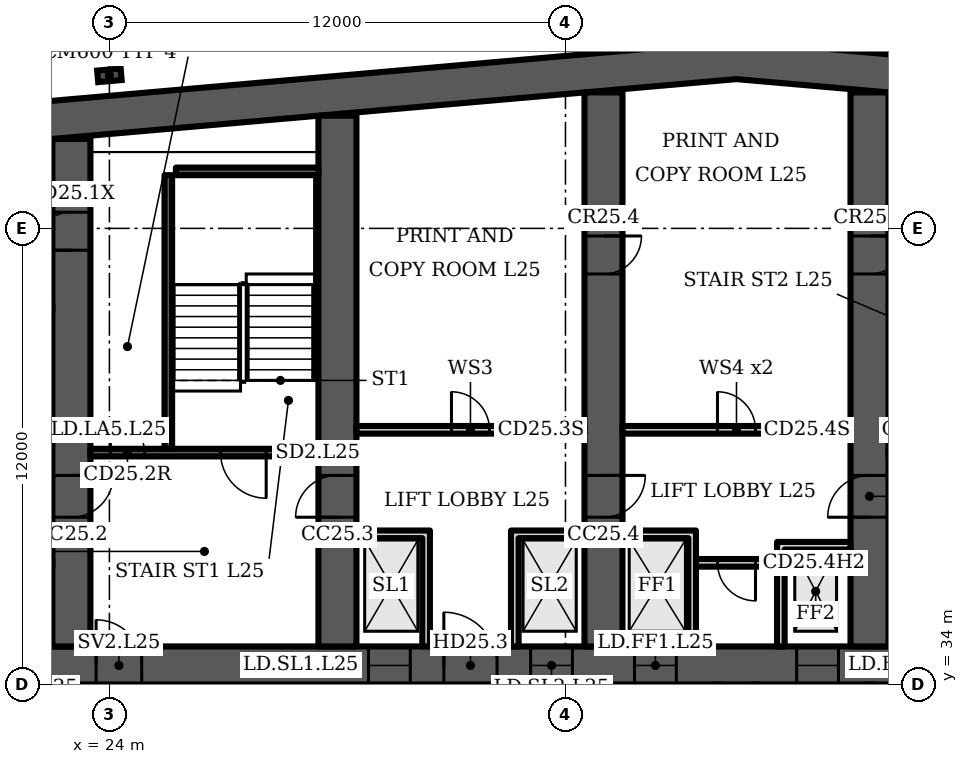
"""IFC4 building model, lengths in metres.
Left out: names, types, materials, properties, quantities, classifications, styles, units other than length and angle.
Written with IfcOpenShell. Run it as: python <this file> out.ifc"""

import sys

from ifc_helpers import new_model, si_unit, direction, frame, frame_2d, origin, origin_2d, place, context, subcontext, project, spatial, polyline, rectangle, i_section, outline, extrude, element, fill, save


model = new_model("IFC4")
c1 = context("Model", 3, precision=1e-05, world=origin(), true_north=direction((0.0, 1.0)))
c2 = subcontext(c1, "Body", "Model", "MODEL_VIEW")
j1 = project(units=[si_unit("LENGTHUNIT", "METRE"), si_unit("PLANEANGLEUNIT", "RADIAN")], contexts=[c1])
p1 = place(None, origin())
s1 = spatial("IfcSite", under=j1, at=p1, CompositionType="ELEMENT")
p2 = place(p1, origin())
s2 = spatial("IfcBuilding", under=s1, at=p2, CompositionType="ELEMENT")
p3 = place(p2, frame((0.0, 0.0, 111.1)))
s3 = spatial("IfcBuildingStorey", under=s2, at=p3, CompositionType="ELEMENT", Elevation=111.1)
p4 = place(p3, frame((0.0, 0.0, -0.0)))
e1 = element("IfcWall", 1, at=p4, inside=s3, PredefinedType="SHEAR", context=c2, shape_type="SweptSolid", body=[
    extrude(outline(polyline([(16.0, 47.784), (40.5, 49.927), (65.0, 47.784), (65.0, 48.787), (40.5, 50.931), (16.0, 48.787), (16.0, 47.784)])), origin(), (0.0, 0.0, 1.0), 3.6),
])
p5 = place(p3, frame((16.0, 34.5, 0.0), z_axis=(0.0, 0.0, 1.0), x_axis=(1.0, 0.0, 0.0)))
e2 = element("IfcWall", 2, at=p5, inside=s3, PredefinedType="SHEAR", context=c2, shape_type="SweptSolid", body=[
    extrude(rectangle(XDim=49.0, YDim=1.0, at=frame_2d((24.5, 0.0))), origin(), (0.0, 0.0, 1.0), 3.6),
])
p6 = place(p5, frame((1.2, 0.0, 0.0)))
e3 = element("IfcOpeningElement", 3, at=p6, cuts=e2, PredefinedType="OPENING", context=c2, shape_type="SweptSolid", body=[
    extrude(rectangle(XDim=1.1, YDim=2.1, at=frame_2d((0.55, 1.05))), frame((0.0, 0.51, 0.0), z_axis=(0.0, -1.0, 0.0), x_axis=(1.0, 0.0, 0.0)), (0.0, 0.0, 1.0), 1.02),
])
p7 = place(p5, frame((5.083, 0.0, 0.0)))
e4 = element("IfcOpeningElement", 4, at=p7, cuts=e2, PredefinedType="OPENING", context=c2, shape_type="SweptSolid", body=[
    extrude(rectangle(XDim=1.1, YDim=2.1, at=frame_2d((0.55, 1.05))), frame((0.0, 0.51, 0.0), z_axis=(0.0, -1.0, 0.0), x_axis=(1.0, 0.0, 0.0)), (0.0, 0.0, 1.0), 1.02),
])
p8 = place(p5, frame((2.933, 0.0, 0.0)))
e5 = element("IfcOpeningElement", 5, at=p8, cuts=e2, PredefinedType="OPENING", context=c2, shape_type="SweptSolid", body=[
    extrude(rectangle(XDim=1.4, YDim=2.1, at=frame_2d((0.7, 1.05))), frame((0.0, 0.51, 0.0), z_axis=(0.0, -1.0, 0.0), x_axis=(1.0, 0.0, 0.0)), (0.0, 0.0, 1.0), 1.02),
])
p9 = place(p5, frame((7.65, 0.0, 0.0)))
e6 = element("IfcOpeningElement", 6, at=p9, cuts=e2, PredefinedType="OPENING", context=c2, shape_type="SweptSolid", body=[
    extrude(rectangle(XDim=1.2, YDim=2.1, at=frame_2d((0.6, 1.05))), frame((0.0, 0.51, 0.0), z_axis=(0.0, -1.0, 0.0), x_axis=(1.0, 0.0, 0.0)), (0.0, 0.0, 1.0), 1.02),
])
p10 = place(p5, frame((14.817, 0.0, 0.0)))
e7 = element("IfcOpeningElement", 7, at=p10, cuts=e2, PredefinedType="OPENING", context=c2, shape_type="SweptSolid", body=[
    extrude(rectangle(XDim=1.1, YDim=2.1, at=frame_2d((0.55, 1.05))), frame((0.0, 0.51, 0.0), z_axis=(0.0, -1.0, 0.0), x_axis=(1.0, 0.0, 0.0)), (0.0, 0.0, 1.0), 1.02),
])
p11 = place(p5, frame((19.083, 0.0, 0.0)))
e8 = element("IfcOpeningElement", 8, at=p11, cuts=e2, PredefinedType="OPENING", context=c2, shape_type="SweptSolid", body=[
    extrude(rectangle(XDim=1.1, YDim=2.1, at=frame_2d((0.55, 1.05))), frame((0.0, 0.51, 0.0), z_axis=(0.0, -1.0, 0.0), x_axis=(1.0, 0.0, 0.0)), (0.0, 0.0, 1.0), 1.02),
])
p12 = place(p5, frame((16.8, 0.0, 0.0)))
e9 = element("IfcOpeningElement", 9, at=p12, cuts=e2, PredefinedType="OPENING", context=c2, shape_type="SweptSolid", body=[
    extrude(rectangle(XDim=1.4, YDim=2.1, at=frame_2d((0.7, 1.05))), frame((0.0, 0.51, 0.0), z_axis=(0.0, -1.0, 0.0), x_axis=(1.0, 0.0, 0.0)), (0.0, 0.0, 1.0), 1.02),
])
p13 = place(p5, frame((21.817, 0.0, 0.0)))
e10 = element("IfcOpeningElement", 10, at=p13, cuts=e2, PredefinedType="OPENING", context=c2, shape_type="SweptSolid", body=[
    extrude(rectangle(XDim=1.1, YDim=2.1, at=frame_2d((0.55, 1.05))), frame((0.0, 0.51, 0.0), z_axis=(0.0, -1.0, 0.0), x_axis=(1.0, 0.0, 0.0)), (0.0, 0.0, 1.0), 1.02),
])
p14 = place(p5, frame((26.083, 0.0, 0.0)))
e11 = element("IfcOpeningElement", 11, at=p14, cuts=e2, PredefinedType="OPENING", context=c2, shape_type="SweptSolid", body=[
    extrude(rectangle(XDim=1.1, YDim=2.1, at=frame_2d((0.55, 1.05))), frame((0.0, 0.51, 0.0), z_axis=(0.0, -1.0, 0.0), x_axis=(1.0, 0.0, 0.0)), (0.0, 0.0, 1.0), 1.02),
])
p15 = place(p5, frame((33.15, 0.0, 0.0)))
e12 = element("IfcOpeningElement", 12, at=p15, cuts=e2, PredefinedType="OPENING", context=c2, shape_type="SweptSolid", body=[
    extrude(rectangle(XDim=1.2, YDim=2.1, at=frame_2d((0.6, 1.05))), frame((0.0, 0.51, 0.0), z_axis=(0.0, -1.0, 0.0), x_axis=(1.0, 0.0, 0.0)), (0.0, 0.0, 1.0), 1.02),
])
p16 = place(p5, frame((37.8, 0.0, 0.0)))
e13 = element("IfcOpeningElement", 13, at=p16, cuts=e2, PredefinedType="OPENING", context=c2, shape_type="SweptSolid", body=[
    extrude(rectangle(XDim=1.4, YDim=2.1, at=frame_2d((0.7, 1.05))), frame((0.0, 0.51, 0.0), z_axis=(0.0, -1.0, 0.0), x_axis=(1.0, 0.0, 0.0)), (0.0, 0.0, 1.0), 1.02),
])
p17 = place(p5, frame((42.817, 0.0, 0.0)))
e14 = element("IfcOpeningElement", 14, at=p17, cuts=e2, PredefinedType="OPENING", context=c2, shape_type="SweptSolid", body=[
    extrude(rectangle(XDim=1.1, YDim=2.1, at=frame_2d((0.55, 1.05))), frame((0.0, 0.51, 0.0), z_axis=(0.0, -1.0, 0.0), x_axis=(1.0, 0.0, 0.0)), (0.0, 0.0, 1.0), 1.02),
])
p18 = place(p5, frame((46.7, 0.0, 0.0)))
e15 = element("IfcOpeningElement", 15, at=p18, cuts=e2, PredefinedType="OPENING", context=c2, shape_type="SweptSolid", body=[
    extrude(rectangle(XDim=1.1, YDim=2.1, at=frame_2d((0.55, 1.05))), frame((0.0, 0.51, 0.0), z_axis=(0.0, -1.0, 0.0), x_axis=(1.0, 0.0, 0.0)), (0.0, 0.0, 1.0), 1.02),
])
p19 = place(p5, frame((44.667, 0.0, 0.0)))
e16 = element("IfcOpeningElement", 16, at=p19, cuts=e2, PredefinedType="OPENING", context=c2, shape_type="SweptSolid", body=[
    extrude(rectangle(XDim=1.4, YDim=2.1, at=frame_2d((0.7, 1.05))), frame((0.0, 0.51, 0.0), z_axis=(0.0, -1.0, 0.0), x_axis=(1.0, 0.0, 0.0)), (0.0, 0.0, 1.0), 1.02),
])
p20 = place(p3, frame((23.0, 35.0, 0.0), z_axis=(0.0, 0.0, 1.0), x_axis=(0.0, 1.0, 0.0)))
e17 = element("IfcWall", 17, at=p20, inside=s3, PredefinedType="SHEAR", context=c2, shape_type="SweptSolid", body=[
    extrude(rectangle(XDim=13.352, YDim=1.0, at=frame_2d((6.676, 0.0))), origin(), (0.0, 0.0, 1.0), 3.6),
])
p21 = place(p20, frame((10.426, 0.0, 0.0)))
e18 = element("IfcOpeningElement", 18, at=p21, cuts=e17, PredefinedType="OPENING", context=c2, shape_type="SweptSolid", body=[
    extrude(rectangle(XDim=1.0, YDim=2.1, at=frame_2d((0.5, 1.05))), frame((0.0, 0.51, 0.0), z_axis=(0.0, -1.0, 0.0), x_axis=(1.0, 0.0, 0.0)), (0.0, 0.0, 1.0), 1.02),
])
p22 = place(p20, frame((3.4, 0.0, 0.0)))
e19 = element("IfcOpeningElement", 19, at=p22, cuts=e17, PredefinedType="OPENING", context=c2, shape_type="SweptSolid", body=[
    extrude(rectangle(XDim=1.1, YDim=2.1, at=frame_2d((0.55, 1.05))), frame((0.0, 0.51, 0.0), z_axis=(0.0, -1.0, 0.0), x_axis=(1.0, 0.0, 0.0)), (0.0, 0.0, 1.0), 1.02),
])
p23 = place(p3, frame((30.0, 35.0, 0.0), z_axis=(0.0, 0.0, 1.0), x_axis=(0.0, 1.0, 0.0)))
e20 = element("IfcWall", 20, at=p23, inside=s3, PredefinedType="SHEAR", context=c2, shape_type="SweptSolid", body=[
    extrude(rectangle(XDim=13.965, YDim=1.0, at=frame_2d((6.982, 0.0))), origin(), (0.0, 0.0, 1.0), 3.6),
])
p24 = place(p23, frame((3.4, 0.0, 0.0)))
e21 = element("IfcOpeningElement", 21, at=p24, cuts=e20, PredefinedType="OPENING", context=c2, shape_type="SweptSolid", body=[
    extrude(rectangle(XDim=1.1, YDim=2.1, at=frame_2d((0.55, 1.05))), frame((0.0, 0.51, 0.0), z_axis=(0.0, -1.0, 0.0), x_axis=(1.0, 0.0, 0.0)), (0.0, 0.0, 1.0), 1.02),
])
p25 = place(p3, frame((37.0, 35.0, 0.0), z_axis=(0.0, 0.0, 1.0), x_axis=(0.0, 1.0, 0.0)))
e22 = element("IfcWall", 22, at=p25, inside=s3, PredefinedType="SHEAR", context=c2, shape_type="SweptSolid", body=[
    extrude(rectangle(XDim=14.577, YDim=1.0, at=frame_2d((7.289, 0.0))), origin(), (0.0, 0.0, 1.0), 3.6),
])
p26 = place(p25, frame((3.4, 0.0, 0.0)))
e23 = element("IfcOpeningElement", 23, at=p26, cuts=e22, PredefinedType="OPENING", context=c2, shape_type="SweptSolid", body=[
    extrude(rectangle(XDim=1.1, YDim=2.1, at=frame_2d((0.55, 1.05))), frame((0.0, 0.51, 0.0), z_axis=(0.0, -1.0, 0.0), x_axis=(1.0, 0.0, 0.0)), (0.0, 0.0, 1.0), 1.02),
])
p27 = place(p25, frame((9.8, 0.0, 0.0)))
e24 = element("IfcOpeningElement", 24, at=p27, cuts=e22, PredefinedType="OPENING", context=c2, shape_type="SweptSolid", body=[
    extrude(rectangle(XDim=1.0, YDim=2.1, at=frame_2d((0.5, 1.05))), frame((0.0, 0.51, 0.0), z_axis=(0.0, -1.0, 0.0), x_axis=(1.0, 0.0, 0.0)), (0.0, 0.0, 1.0), 1.02),
])
p28 = place(p3, frame((44.0, 35.0, 0.0), z_axis=(0.0, 0.0, 1.0), x_axis=(0.0, 1.0, 0.0)))
e25 = element("IfcWall", 25, at=p28, inside=s3, PredefinedType="SHEAR", context=c2, shape_type="SweptSolid", body=[
    extrude(rectangle(XDim=14.577, YDim=1.0, at=frame_2d((7.289, 0.0))), origin(), (0.0, 0.0, 1.0), 3.6),
])
p29 = place(p28, frame((3.4, 0.0, 0.0)))
e26 = element("IfcOpeningElement", 26, at=p29, cuts=e25, PredefinedType="OPENING", context=c2, shape_type="SweptSolid", body=[
    extrude(rectangle(XDim=1.1, YDim=2.1, at=frame_2d((0.55, 1.05))), frame((0.0, 0.51, 0.0), z_axis=(0.0, -1.0, 0.0), x_axis=(1.0, 0.0, 0.0)), (0.0, 0.0, 1.0), 1.02),
])
p30 = place(p28, frame((9.8, 0.0, 0.0)))
e27 = element("IfcOpeningElement", 27, at=p30, cuts=e25, PredefinedType="OPENING", context=c2, shape_type="SweptSolid", body=[
    extrude(rectangle(XDim=1.0, YDim=2.1, at=frame_2d((0.5, 1.05))), frame((0.0, 0.51, 0.0), z_axis=(0.0, -1.0, 0.0), x_axis=(1.0, 0.0, 0.0)), (0.0, 0.0, 1.0), 1.02),
])
p31 = place(p3, frame((24.0, 50.027, 0.0), z_axis=(0.0, 0.0, 1.0), x_axis=(-0.087156, 0.996198, 0.0)))
e28 = element("IfcColumn", 28, at=p31, inside=s3, PredefinedType="COLUMN", context=c2, shape_type="SweptSolid", body=[
    extrude(i_section(OverallWidth=0.305, OverallDepth=0.62, WebThickness=0.021, FlangeThickness=0.04, FilletRadius=0.027, at=origin_2d()), origin(), (0.0, 0.0, 1.0), 3.6),
])
p32 = place(p3, frame((23.5, 40.1, 0.0), z_axis=(0.0, 0.0, 1.0), x_axis=(1.0, 0.0, 0.0)))
e29 = element("IfcWall", 29, at=p32, inside=s3, PredefinedType="SHEAR", context=c2, shape_type="SweptSolid", body=[
    extrude(rectangle(XDim=6.0, YDim=0.2, at=frame_2d((3.0, 0.0))), origin(), (0.0, 0.0, 1.0), 3.2),
])
p33 = place(p32, frame((3.425, 0.0, 0.0)))
e30 = element("IfcOpeningElement", 30, at=p33, cuts=e29, PredefinedType="OPENING", context=c2, shape_type="SweptSolid", body=[
    extrude(rectangle(XDim=1.2, YDim=2.1, at=frame_2d((0.6, 1.05))), frame((0.0, 0.11, 0.0), z_axis=(0.0, -1.0, 0.0), x_axis=(1.0, 0.0, 0.0)), (0.0, 0.0, 1.0), 0.22),
])
p34 = place(p32, frame((0.525, 0.0, 0.0)))
e31 = element("IfcOpeningElement", 31, at=p34, cuts=e29, PredefinedType="OPENING", context=c2, shape_type="SweptSolid", body=[
    extrude(rectangle(XDim=0.9, YDim=2.1, at=frame_2d((0.45, 1.05))), frame((0.0, 0.11, 0.0), z_axis=(0.0, -1.0, 0.0), x_axis=(1.0, 0.0, 0.0)), (0.0, 0.0, 1.0), 0.22),
])
p35 = place(p3, frame((25.55, 40.2, 0.0), z_axis=(0.0, 0.0, 1.0), x_axis=(0.0, 1.0, 0.0)))
e32 = element("IfcWall", 32, at=p35, inside=s3, PredefinedType="SHEAR", context=c2, shape_type="SweptSolid", body=[
    extrude(rectangle(XDim=7.2, YDim=0.2, at=frame_2d((3.6, 0.0))), origin(), (0.0, 0.0, 1.0), 3.2),
])
p36 = place(p3, frame((25.75, 47.5, 0.0), z_axis=(0.0, 0.0, 1.0), x_axis=(1.0, 0.0, 0.0)))
e33 = element("IfcWall", 33, at=p36, inside=s3, PredefinedType="SHEAR", context=c2, shape_type="SweptSolid", body=[
    extrude(rectangle(XDim=3.75, YDim=0.2, at=frame_2d((1.875, 0.0))), origin(), (0.0, 0.0, 1.0), 3.2),
])
p37 = place(p3, frame((30.5, 40.7, 0.0), z_axis=(0.0, 0.0, 1.0), x_axis=(1.0, 0.0, 0.0)))
e34 = element("IfcWall", 34, at=p37, inside=s3, PredefinedType="PARTITIONING", context=c2, shape_type="SweptSolid", body=[
    extrude(rectangle(XDim=6.0, YDim=0.2, at=frame_2d((3.0, 0.0))), origin(), (0.0, 0.0, 1.0), 3.2),
])
p38 = place(p37, frame((2.5, 0.0, 0.0)))
e35 = element("IfcOpeningElement", 35, at=p38, cuts=e34, PredefinedType="OPENING", context=c2, shape_type="SweptSolid", body=[
    extrude(rectangle(XDim=1.0, YDim=2.1, at=frame_2d((0.5, 1.05))), frame((0.0, 0.11, 0.0), z_axis=(0.0, -1.0, 0.0), x_axis=(1.0, 0.0, 0.0)), (0.0, 0.0, 1.0), 0.22),
])
p39 = place(p3, frame((0.0, 0.0, -0.0)))
e36 = element("IfcWall", 36, at=p39, inside=s3, PredefinedType="PARTITIONING", context=c2, shape_type="SweptSolid", body=[
    extrude(outline(polyline([(32.233, 37.85), (30.5, 37.85), (30.5, 38.05), (32.233, 38.05), (32.433, 38.05), (32.433, 35.0), (32.233, 35.0), (32.233, 37.85)])), origin(), (0.0, 0.0, 1.0), 3.2),
])
p40 = place(p3, frame((0.0, 0.0, -0.0)))
e37 = element("IfcWall", 37, at=p40, inside=s3, PredefinedType="PARTITIONING", context=c2, shape_type="SweptSolid", body=[
    extrude(outline(polyline([(34.567, 38.05), (34.767, 38.05), (36.5, 38.05), (36.5, 37.85), (34.767, 37.85), (34.767, 35.0), (34.567, 35.0), (34.567, 38.05)])), origin(), (0.0, 0.0, 1.0), 3.2),
])
p41 = place(p3, frame((39.433, 37.2, 0.0), z_axis=(0.0, 0.0, 1.0), x_axis=(1.0, 0.0, 0.0)))
e38 = element("IfcWall", 38, at=p41, inside=s3, PredefinedType="PARTITIONING", context=c2, shape_type="SweptSolid", body=[
    extrude(rectangle(XDim=2.133, YDim=0.2, at=frame_2d((1.067, 0.0))), origin(), (0.0, 0.0, 1.0), 3.2),
])
p42 = place(p41, frame((0.567, 0.0, 0.0)))
e39 = element("IfcOpeningElement", 39, at=p42, cuts=e38, PredefinedType="OPENING", context=c2, shape_type="SweptSolid", body=[
    extrude(rectangle(XDim=1.0, YDim=2.1, at=frame_2d((0.5, 1.05))), frame((0.0, 0.11, 0.0), z_axis=(0.0, -1.0, 0.0), x_axis=(1.0, 0.0, 0.0)), (0.0, 0.0, 1.0), 0.22),
])
p43 = place(p3, frame((37.5, 40.7, 0.0), z_axis=(0.0, 0.0, 1.0), x_axis=(1.0, 0.0, 0.0)))
e40 = element("IfcWall", 40, at=p43, inside=s3, PredefinedType="PARTITIONING", context=c2, shape_type="SweptSolid", body=[
    extrude(rectangle(XDim=6.0, YDim=0.2, at=frame_2d((3.0, 0.0))), origin(), (0.0, 0.0, 1.0), 3.2),
])
p44 = place(p43, frame((2.5, 0.0, 0.0)))
e41 = element("IfcOpeningElement", 41, at=p44, cuts=e40, PredefinedType="OPENING", context=c2, shape_type="SweptSolid", body=[
    extrude(rectangle(XDim=1.0, YDim=2.1, at=frame_2d((0.5, 1.05))), frame((0.0, 0.11, 0.0), z_axis=(0.0, -1.0, 0.0), x_axis=(1.0, 0.0, 0.0)), (0.0, 0.0, 1.0), 0.22),
])
p45 = place(p3, frame((0.0, 0.0, -0.0)))
e42 = element("IfcWall", 42, at=p45, inside=s3, PredefinedType="PARTITIONING", context=c2, shape_type="SweptSolid", body=[
    extrude(outline(polyline([(41.567, 37.75), (41.767, 37.75), (43.5, 37.75), (43.5, 37.55), (41.767, 37.55), (41.767, 35.0), (41.567, 35.0), (41.567, 37.75)])), origin(), (0.0, 0.0, 1.0), 3.2),
])
p46 = place(p3, frame((0.0, 0.0, -0.0)))
e43 = element("IfcWall", 43, at=p46, inside=s3, PredefinedType="PARTITIONING", context=c2, shape_type="SweptSolid", body=[
    extrude(outline(polyline([(39.233, 37.85), (37.5, 37.85), (37.5, 38.05), (39.233, 38.05), (39.433, 38.05), (39.433, 35.0), (39.233, 35.0), (39.233, 37.85)])), origin(), (0.0, 0.0, 1.0), 3.2),
])
p47 = place(p21, origin())
e44 = element("IfcDoor", 44, at=p47, inside=s3, OperationType="SINGLE_SWING_LEFT", PredefinedType="DOOR", context=c2, shape_type="SweptSolid", body=[
    extrude(rectangle(XDim=1.0, YDim=2.1, at=frame_2d((0.5, 1.05))), frame((0.0, 0.5, 0.0), z_axis=(0.0, -1.0, 0.0), x_axis=(1.0, 0.0, 0.0)), (0.0, 0.0, 1.0), 1.0),
])
fill(e18, e44)
p48 = place(p33, origin())
e45 = element("IfcDoor", 45, at=p48, inside=s3, OperationType="SINGLE_SWING_RIGHT", PredefinedType="DOOR", context=c2, shape_type="SweptSolid", body=[
    extrude(rectangle(XDim=1.2, YDim=2.1, at=frame_2d((0.6, 1.05))), frame((0.0, 0.025, 0.0), z_axis=(0.0, -1.0, 0.0), x_axis=(1.0, 0.0, 0.0)), (0.0, 0.0, 1.0), 0.05),
])
fill(e30, e45)
p49 = place(p34, origin())
e46 = element("IfcDoor", 46, at=p49, inside=s3, OperationType="SINGLE_SWING_LEFT", PredefinedType="DOOR", context=c2, shape_type="SweptSolid", body=[
    extrude(rectangle(XDim=0.9, YDim=2.1, at=frame_2d((0.45, 1.05))), frame((0.0, 0.025, 0.0), z_axis=(0.0, -1.0, 0.0), x_axis=(1.0, 0.0, 0.0)), (0.0, 0.0, 1.0), 0.05),
])
fill(e31, e46)
p50 = place(p9, origin())
e47 = element("IfcDoor", 47, at=p50, inside=s3, OperationType="SINGLE_SWING_LEFT", PredefinedType="DOOR", context=c2, shape_type="SweptSolid", body=[
    extrude(rectangle(XDim=1.2, YDim=2.1, at=frame_2d((0.6, 1.05))), frame((0.0, 0.025, 0.0), z_axis=(0.0, -1.0, 0.0), x_axis=(1.0, 0.0, 0.0)), (0.0, 0.0, 1.0), 0.05),
])
fill(e6, e47)
p51 = place(p10, origin())
e48 = element("IfcDoor", 48, at=p51, inside=s3, OperationType="DOUBLE_DOOR_SLIDING", PredefinedType="DOOR", context=c2, shape_type="SweptSolid", body=[
    extrude(rectangle(XDim=1.1, YDim=2.1, at=frame_2d((0.55, 1.05))), frame((0.0, 0.025, 0.0), z_axis=(0.0, -1.0, 0.0), x_axis=(1.0, 0.0, 0.0)), (0.0, 0.0, 1.0), 0.05),
])
fill(e7, e48)
p52 = place(p11, origin())
e49 = element("IfcDoor", 49, at=p52, inside=s3, OperationType="DOUBLE_DOOR_SLIDING", PredefinedType="DOOR", context=c2, shape_type="SweptSolid", body=[
    extrude(rectangle(XDim=1.1, YDim=2.1, at=frame_2d((0.55, 1.05))), frame((0.0, 0.025, 0.0), z_axis=(0.0, -1.0, 0.0), x_axis=(1.0, 0.0, 0.0)), (0.0, 0.0, 1.0), 0.05),
])
fill(e8, e49)
p53 = place(p12, origin())
e50 = element("IfcDoor", 50, at=p53, inside=s3, OperationType="DOUBLE_DOOR_SINGLE_SWING", PredefinedType="DOOR", context=c2, shape_type="SweptSolid", body=[
    extrude(rectangle(XDim=1.4, YDim=2.1, at=frame_2d((0.7, 1.05))), frame((0.0, 0.025, 0.0), z_axis=(0.0, -1.0, 0.0), x_axis=(1.0, 0.0, 0.0)), (0.0, 0.0, 1.0), 0.05),
])
fill(e9, e50)
p54 = place(p38, origin())
e51 = element("IfcDoor", 51, at=p54, inside=s3, OperationType="SINGLE_SWING_LEFT", PredefinedType="DOOR", context=c2, shape_type="SweptSolid", body=[
    extrude(rectangle(XDim=1.0, YDim=2.1, at=frame_2d((0.5, 1.05))), frame((0.0, 0.025, 0.0), z_axis=(0.0, -1.0, 0.0), x_axis=(1.0, 0.0, 0.0)), (0.0, 0.0, 1.0), 0.05),
])
fill(e35, e51)
p55 = place(p42, origin())
e52 = element("IfcDoor", 52, at=p55, inside=s3, OperationType="SINGLE_SWING_RIGHT", PredefinedType="DOOR", context=c2, shape_type="SweptSolid", body=[
    extrude(rectangle(XDim=1.0, YDim=2.1, at=frame_2d((0.5, 1.05))), frame((0.0, 0.025, 0.0), z_axis=(0.0, -1.0, 0.0), x_axis=(1.0, 0.0, 0.0)), (0.0, 0.0, 1.0), 0.05),
])
fill(e39, e52)
p56 = place(p13, origin())
e53 = element("IfcDoor", 53, at=p56, inside=s3, OperationType="DOUBLE_DOOR_SLIDING", PredefinedType="DOOR", context=c2, shape_type="SweptSolid", body=[
    extrude(rectangle(XDim=1.1, YDim=2.1, at=frame_2d((0.55, 1.05))), frame((0.0, 0.025, 0.0), z_axis=(0.0, -1.0, 0.0), x_axis=(1.0, 0.0, 0.0)), (0.0, 0.0, 1.0), 0.05),
])
fill(e10, e53)
p57 = place(p14, origin())
e54 = element("IfcDoor", 54, at=p57, inside=s3, OperationType="DOUBLE_DOOR_SLIDING", PredefinedType="DOOR", context=c2, shape_type="SweptSolid", body=[
    extrude(rectangle(XDim=1.1, YDim=2.1, at=frame_2d((0.55, 1.05))), frame((0.0, 0.025, 0.0), z_axis=(0.0, -1.0, 0.0), x_axis=(1.0, 0.0, 0.0)), (0.0, 0.0, 1.0), 0.05),
])
fill(e11, e54)
p58 = place(p44, origin())
e55 = element("IfcDoor", 55, at=p58, inside=s3, OperationType="SINGLE_SWING_LEFT", PredefinedType="DOOR", context=c2, shape_type="SweptSolid", body=[
    extrude(rectangle(XDim=1.0, YDim=2.1, at=frame_2d((0.5, 1.05))), frame((0.0, 0.025, 0.0), z_axis=(0.0, -1.0, 0.0), x_axis=(1.0, 0.0, 0.0)), (0.0, 0.0, 1.0), 0.05),
])
fill(e41, e55)
p59 = place(p22, origin())
e56 = element("IfcDoor", 56, at=p59, inside=s3, OperationType="SINGLE_SWING_RIGHT", PredefinedType="DOOR", context=c2, shape_type="SweptSolid", body=[
    extrude(rectangle(XDim=1.1, YDim=2.1, at=frame_2d((0.55, 1.05))), frame((0.0, 0.025, 0.0), z_axis=(0.0, -1.0, 0.0), x_axis=(1.0, 0.0, 0.0)), (0.0, 0.0, 1.0), 0.05),
])
fill(e19, e56)
p60 = place(p24, origin())
e57 = element("IfcDoor", 57, at=p60, inside=s3, OperationType="SINGLE_SWING_LEFT", PredefinedType="DOOR", context=c2, shape_type="SweptSolid", body=[
    extrude(rectangle(XDim=1.1, YDim=2.1, at=frame_2d((0.55, 1.05))), frame((0.0, 0.025, 0.0), z_axis=(0.0, -1.0, 0.0), x_axis=(1.0, 0.0, 0.0)), (0.0, 0.0, 1.0), 0.05),
])
fill(e21, e57)
p61 = place(p26, origin())
e58 = element("IfcDoor", 58, at=p61, inside=s3, OperationType="SINGLE_SWING_RIGHT", PredefinedType="DOOR", context=c2, shape_type="SweptSolid", body=[
    extrude(rectangle(XDim=1.1, YDim=2.1, at=frame_2d((0.55, 1.05))), frame((0.0, 0.025, 0.0), z_axis=(0.0, -1.0, 0.0), x_axis=(1.0, 0.0, 0.0)), (0.0, 0.0, 1.0), 0.05),
])
fill(e23, e58)
p62 = place(p27, origin())
e59 = element("IfcDoor", 59, at=p62, inside=s3, OperationType="SINGLE_SWING_RIGHT", PredefinedType="DOOR", context=c2, shape_type="SweptSolid", body=[
    extrude(rectangle(XDim=1.0, YDim=2.1, at=frame_2d((0.5, 1.05))), frame((0.0, 0.5, 0.0), z_axis=(0.0, -1.0, 0.0), x_axis=(1.0, 0.0, 0.0)), (0.0, 0.0, 1.0), 1.0),
])
fill(e24, e59)
p63 = place(p29, origin())
e60 = element("IfcDoor", 60, at=p63, inside=s3, OperationType="SINGLE_SWING_LEFT", PredefinedType="DOOR", context=c2, shape_type="SweptSolid", body=[
    extrude(rectangle(XDim=1.1, YDim=2.1, at=frame_2d((0.55, 1.05))), frame((0.0, 0.025, 0.0), z_axis=(0.0, -1.0, 0.0), x_axis=(1.0, 0.0, 0.0)), (0.0, 0.0, 1.0), 0.05),
])
fill(e26, e60)
p64 = place(p30, origin())
e61 = element("IfcDoor", 61, at=p64, inside=s3, OperationType="SINGLE_SWING_RIGHT", PredefinedType="DOOR", context=c2, shape_type="SweptSolid", body=[
    extrude(rectangle(XDim=1.0, YDim=2.1, at=frame_2d((0.5, 1.05))), frame((0.0, 0.5, 0.0), z_axis=(0.0, -1.0, 0.0), x_axis=(1.0, 0.0, 0.0)), (0.0, 0.0, 1.0), 1.0),
])
fill(e27, e61)
save(model, sys.argv[1])
